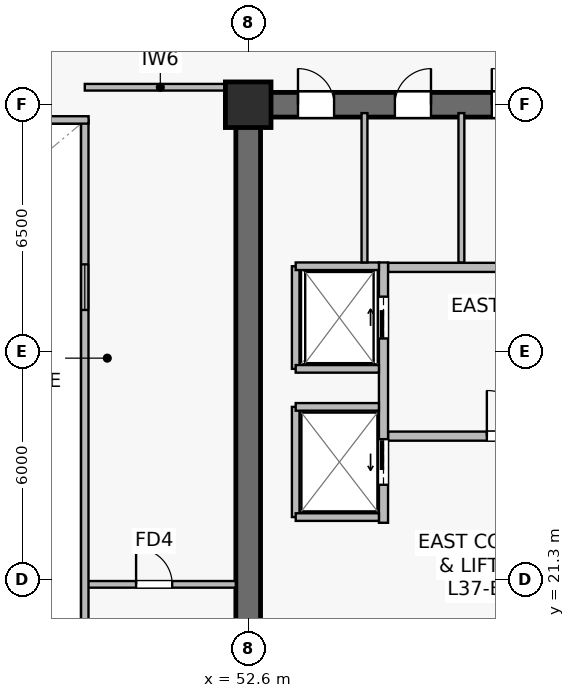
"""IFC4 building model, lengths in metres.
Left out: names, types, materials, properties, quantities, classifications, styles, units other than length and angle.
Written with IfcOpenShell. Run it as: python <this file> out.ifc"""

import sys

from ifc_helpers import new_model, si_unit, direction, frame, frame_2d, origin, origin_2d, place, context, subcontext, project, spatial, rectangle, extrude, source, transform, mapped, element, fill, save


model = new_model("IFC4")
c1 = context("Model", 3, precision=1e-05, world=origin(), true_north=direction((0.0, 1.0)))
c2 = subcontext(c1, "Body", "Model", "MODEL_VIEW")
j1 = project(units=[si_unit("LENGTHUNIT", "METRE"), si_unit("PLANEANGLEUNIT", "RADIAN")], contexts=[c1])
p1 = place(None, origin())
s1 = spatial("IfcSite", under=j1, at=p1, CompositionType="ELEMENT")
p2 = place(p1, origin())
s2 = spatial("IfcBuilding", under=s1, at=p2, CompositionType="ELEMENT")
p3 = place(p2, frame((0.0, 0.0, 154.3)))
s3 = spatial("IfcBuildingStorey", under=s2, at=p3, CompositionType="ELEMENT", Elevation=154.3)
p4 = place(p3, frame((52.275, 33.8, 0.0), z_axis=(0.0, 0.0, 1.0), x_axis=(1.0, 0.0, 0.0)))
e1 = element("IfcWall", 1, at=p4, inside=s3, PredefinedType="SHEAR", context=c2, shape_type="SweptSolid", body=[
    extrude(rectangle(XDim=15.45, YDim=0.65, at=frame_2d((7.725, 0.0))), origin(), (0.0, 0.0, 1.0), 3.79),
])
p5 = place(p4, frame((9.25, 0.0, 0.0)))
e2 = element("IfcOpeningElement", 2, at=p5, cuts=e1, PredefinedType="OPENING", context=c2, shape_type="SweptSolid", body=[
    extrude(rectangle(XDim=0.95, YDim=2.15, at=frame_2d((0.475, 1.075))), frame((0.0, 0.335, 0.0), z_axis=(0.0, -1.0, 0.0), x_axis=(1.0, 0.0, 0.0)), (0.0, 0.0, 1.0), 0.67),
])
p6 = place(p4, frame((6.735, 0.0, 0.0)))
e3 = element("IfcOpeningElement", 3, at=p6, cuts=e1, PredefinedType="OPENING", context=c2, shape_type="SweptSolid", body=[
    extrude(rectangle(XDim=0.95, YDim=2.15, at=frame_2d((0.475, 1.075))), frame((0.0, 0.335, 0.0), z_axis=(0.0, -1.0, 0.0), x_axis=(1.0, 0.0, 0.0)), (0.0, 0.0, 1.0), 0.67),
])
p7 = place(p4, frame((4.185, 0.0, 0.0)))
e4 = element("IfcOpeningElement", 4, at=p7, cuts=e1, PredefinedType="OPENING", context=c2, shape_type="SweptSolid", body=[
    extrude(rectangle(XDim=0.95, YDim=2.15, at=frame_2d((0.475, 1.075))), frame((0.0, 0.335, 0.0), z_axis=(0.0, -1.0, 0.0), x_axis=(1.0, 0.0, 0.0)), (0.0, 0.0, 1.0), 0.67),
])
p8 = place(p4, frame((1.635, 0.0, 0.0)))
e5 = element("IfcOpeningElement", 5, at=p8, cuts=e1, PredefinedType="OPENING", context=c2, shape_type="SweptSolid", body=[
    extrude(rectangle(XDim=0.95, YDim=2.15, at=frame_2d((0.475, 1.075))), frame((0.0, 0.335, 0.0), z_axis=(0.0, -1.0, 0.0), x_axis=(1.0, 0.0, 0.0)), (0.0, 0.0, 1.0), 0.67),
])
p9 = place(p3, frame((52.6, 15.125, 0.0), z_axis=(0.0, 0.0, 1.0), x_axis=(0.0, 1.0, 0.0)))
e6 = element("IfcWall", 6, at=p9, inside=s3, PredefinedType="SHEAR", context=c2, shape_type="SweptSolid", body=[
    extrude(rectangle(XDim=18.35, YDim=0.65, at=frame_2d((9.175, 0.0))), origin(), (0.0, 0.0, 1.0), 3.79),
])
p10 = place(p9, frame((3.425, 0.0, 0.0)))
e7 = element("IfcOpeningElement", 7, at=p10, cuts=e6, PredefinedType="OPENING", context=c2, shape_type="SweptSolid", body=[
    extrude(rectangle(XDim=1.42, YDim=2.2, at=frame_2d((0.71, 1.1))), frame((0.0, 0.335, 0.0), z_axis=(0.0, -1.0, 0.0), x_axis=(1.0, 0.0, 0.0)), (0.0, 0.0, 1.0), 0.67),
])
m1 = source(origin(), c2, "Body", "SweptSolid", [
    extrude(rectangle(XDim=1.2, YDim=1.2, at=origin_2d()), origin(), (0.0, 0.0, 1.0), 4.1),
])
p11 = place(p3, frame((52.6, 33.8, 0.0), z_axis=(0.0, 0.0, 1.0), x_axis=(1.0, 0.0, 0.0)))
e8 = element("IfcColumn", 8, at=p11, inside=s3, PredefinedType="COLUMN", context=c2, shape_type="MappedRepresentation", body=[
    mapped(m1, transform((0.0, 0.0, 0.0), scale=1.0)),
])
p12 = place(p3, frame((56.28, 25.08, 0.0), z_axis=(0.0, 0.0, 1.0), x_axis=(1.0, 0.0, 0.0)))
e9 = element("IfcWall", 9, at=p12, inside=s3, PredefinedType="SOLIDWALL", context=c2, shape_type="SweptSolid", body=[
    extrude(rectangle(XDim=6.92, YDim=0.24, at=frame_2d((3.46, 0.0))), origin(), (0.0, 0.0, 1.0), 3.187),
])
p13 = place(p12, frame((2.6, 0.0, 0.0)))
e10 = element("IfcOpeningElement", 10, at=p13, cuts=e9, PredefinedType="OPENING", context=c2, shape_type="SweptSolid", body=[
    extrude(rectangle(XDim=1.2, YDim=2.16, at=frame_2d((0.6, 1.08))), frame((0.0, 0.13, 0.0), z_axis=(0.0, -1.0, 0.0), x_axis=(1.0, 0.0, 0.0)), (0.0, 0.0, 1.0), 0.26),
])
p14 = place(p3, frame((56.28, 29.52, 0.0), z_axis=(0.0, 0.0, 1.0), x_axis=(1.0, 0.0, 0.0)))
e11 = element("IfcWall", 11, at=p14, inside=s3, PredefinedType="SOLIDWALL", context=c2, shape_type="SweptSolid", body=[
    extrude(rectangle(XDim=6.92, YDim=0.24, at=frame_2d((3.46, 0.0))), origin(), (0.0, 0.0, 1.0), 3.187),
])
p15 = place(p3, frame((56.16, 22.8, 0.0), z_axis=(0.0, 0.0, 1.0), x_axis=(0.0, 1.0, 0.0)))
e12 = element("IfcWall", 12, at=p15, inside=s3, PredefinedType="SOLIDWALL", context=c2, shape_type="SweptSolid", body=[
    extrude(rectangle(XDim=6.85, YDim=0.24, at=frame_2d((3.425, 0.0))), origin(), (0.0, 0.0, 1.0), 2.875),
])
p16 = place(p15, frame((4.85, 0.0, 0.0)))
e13 = element("IfcOpeningElement", 13, at=p16, cuts=e12, PredefinedType="OPENING", context=c2, shape_type="SweptSolid", body=[
    extrude(rectangle(XDim=1.1, YDim=2.22, at=frame_2d((0.55, 1.11))), frame((0.0, 0.13, 0.0), z_axis=(0.0, -1.0, 0.0), x_axis=(1.0, 0.0, 0.0)), (0.0, 0.0, 1.0), 0.26),
])
p17 = place(p15, frame((1.0, 0.0, 0.0)))
e14 = element("IfcOpeningElement", 14, at=p17, cuts=e12, PredefinedType="OPENING", context=c2, shape_type="SweptSolid", body=[
    extrude(rectangle(XDim=1.2, YDim=2.22, at=frame_2d((0.6, 1.11))), frame((0.0, 0.13, 0.0), z_axis=(0.0, -1.0, 0.0), x_axis=(1.0, 0.0, 0.0)), (0.0, 0.0, 1.0), 0.26),
])
p18 = place(p3, frame((53.85, 26.85, 0.0), z_axis=(0.0, 0.0, 1.0), x_axis=(0.0, 1.0, 0.0)))
e15 = element("IfcWall", 15, at=p18, inside=s3, PredefinedType="SOLIDWALL", context=c2, shape_type="SweptSolid", body=[
    extrude(rectangle(XDim=2.7, YDim=0.2, at=frame_2d((1.35, 0.0))), origin(), (0.0, 0.0, 1.0), 3.79),
])
p19 = place(p3, frame((53.85, 29.55, 0.0), z_axis=(0.0, 0.0, 1.0), x_axis=(1.0, 0.0, 0.0)))
e16 = element("IfcWall", 16, at=p19, inside=s3, PredefinedType="SOLIDWALL", context=c2, shape_type="SweptSolid", body=[
    extrude(rectangle(XDim=2.19, YDim=0.2, at=frame_2d((1.095, 0.0))), origin(), (0.0, 0.0, 1.0), 3.79),
])
p20 = place(p3, frame((53.85, 26.85, 0.0), z_axis=(0.0, 0.0, 1.0), x_axis=(1.0, 0.0, 0.0)))
e17 = element("IfcWall", 17, at=p20, inside=s3, PredefinedType="SOLIDWALL", context=c2, shape_type="SweptSolid", body=[
    extrude(rectangle(XDim=2.19, YDim=0.2, at=frame_2d((1.095, 0.0))), origin(), (0.0, 0.0, 1.0), 3.187),
])
p21 = place(p3, frame((53.85, 22.95, 0.0), z_axis=(0.0, 0.0, 1.0), x_axis=(0.0, 1.0, 0.0)))
e18 = element("IfcWall", 18, at=p21, inside=s3, PredefinedType="SOLIDWALL", context=c2, shape_type="SweptSolid", body=[
    extrude(rectangle(XDim=2.9, YDim=0.2, at=frame_2d((1.45, 0.0))), origin(), (0.0, 0.0, 1.0), 2.875),
])
for number, where, z_axis, x_axis in (
    (19, (53.85, 25.85, 0.0), (0.0, 0.0, 1.0), (1.0, 0.0, 0.0)),
    (20, (53.85, 22.95, 0.0), (0.0, 0.0, 1.0), (1.0, 0.0, 0.0)),
):
    element("IfcWall", number, at=place(p3, frame(where, z_axis=z_axis, x_axis=x_axis)), inside=s3, PredefinedType="SOLIDWALL", context=c2, shape_type="SweptSolid", body=[
        extrude(rectangle(XDim=2.19, YDim=0.2, at=frame_2d((1.095, 0.0))), origin(), (0.0, 0.0, 1.0), 3.79),
    ])
for number, where, z_axis, x_axis in (
    (21, (58.21, 29.65, 0.0), (0.0, 0.0, 1.0), (0.0, 1.0, 0.0)),
    (22, (55.66, 29.65, 0.0), (0.0, 0.0, 1.0), (0.0, 1.0, 0.0)),
):
    element("IfcWall", number, at=place(p3, frame(where, z_axis=z_axis, x_axis=x_axis)), inside=s3, PredefinedType="PLUMBINGWALL", context=c2, shape_type="SweptSolid", body=[
        extrude(rectangle(XDim=3.93, YDim=0.155, at=frame_2d((1.965, 0.0))), origin(), (0.0, 0.0, 1.0), 3.79),
    ])
p22 = place(p3, frame((48.3, 34.26, 0.0), z_axis=(0.0, 0.0, 1.0), x_axis=(1.0, 0.0, 0.0)))
e23 = element("IfcWall", 23, at=p22, inside=s3, PredefinedType="PARTITIONING", context=c2, shape_type="SweptSolid", body=[
    extrude(rectangle(XDim=3.975, YDim=0.175, at=frame_2d((1.987, 0.0))), origin(), (0.0, 0.0, 1.0), 3.475),
])
p23 = place(p3, frame((48.3, 21.18, 0.0), z_axis=(0.0, 0.0, 1.0), x_axis=(1.0, 0.0, 0.0)))
e24 = element("IfcWall", 24, at=p23, inside=s3, PredefinedType="PARTITIONING", context=c2, shape_type="SweptSolid", body=[
    extrude(rectangle(XDim=3.975, YDim=0.175, at=frame_2d((1.987, 0.0))), origin(), (0.0, 0.0, 1.0), 3.79),
])
p24 = place(p23, frame((1.35, 0.0, 0.0)))
e25 = element("IfcOpeningElement", 25, at=p24, cuts=e24, PredefinedType="OPENING", context=c2, shape_type="SweptSolid", body=[
    extrude(rectangle(XDim=0.95, YDim=2.15, at=frame_2d((0.475, 1.075))), frame((0.0, 0.098, 0.0), z_axis=(0.0, -1.0, 0.0), x_axis=(1.0, 0.0, 0.0)), (0.0, 0.0, 1.0), 0.195),
])
p25 = place(p3, frame((48.3, 15.2, 0.0), z_axis=(0.0, 0.0, 1.0), x_axis=(0.0, 1.0, 0.0)))
e26 = element("IfcWall", 26, at=p25, inside=s3, PredefinedType="SOLIDWALL", context=c2, shape_type="SweptSolid", body=[
    extrude(rectangle(XDim=18.2, YDim=0.195, at=frame_2d((9.1, 0.0))), origin(), (0.0, 0.0, 1.0), 3.79),
])
p26 = place(p25, frame((1.8, 0.0, 0.9)))
e27 = element("IfcOpeningElement", 27, at=p26, cuts=e26, PredefinedType="OPENING", context=c2, shape_type="SweptSolid", body=[
    extrude(rectangle(XDim=1.2, YDim=1.35, at=frame_2d((0.6, 0.675))), frame((0.0, 0.107, 0.0), z_axis=(0.0, -1.0, 0.0), x_axis=(1.0, 0.0, 0.0)), (0.0, 0.0, 1.0), 0.215),
])
p27 = place(p25, frame((13.2, 0.0, 0.9)))
e28 = element("IfcOpeningElement", 28, at=p27, cuts=e26, PredefinedType="OPENING", context=c2, shape_type="SweptSolid", body=[
    extrude(rectangle(XDim=1.2, YDim=1.35, at=frame_2d((0.6, 0.675))), frame((0.0, 0.107, 0.0), z_axis=(0.0, -1.0, 0.0), x_axis=(1.0, 0.0, 0.0)), (0.0, 0.0, 1.0), 0.215),
])
p28 = place(p3, frame((26.4, 33.4, 0.0), z_axis=(0.0, 0.0, 1.0), x_axis=(1.0, 0.0, 0.0)))
e29 = element("IfcWall", 29, at=p28, inside=s3, PredefinedType="SOLIDWALL", context=c2, shape_type="SweptSolid", body=[
    extrude(rectangle(XDim=22.0, YDim=0.195, at=frame_2d((11.0, 0.0))), origin(), (0.0, 0.0, 1.0), 3.79),
])
m2 = source(origin(), c2, "Body", "SweptSolid", [
    extrude(rectangle(XDim=1.2, YDim=1.35, at=frame_2d((0.6, 0.675))), frame((0.0, 0.03, 0.0), z_axis=(0.0, -1.0, 0.0), x_axis=(1.0, 0.0, 0.0)), (0.0, 0.0, 1.0), 0.06),
])
p29 = place(p27, origin())
e30 = element("IfcWindow", 30, at=p29, inside=s3, PartitioningType="SINGLE_PANEL", PredefinedType="WINDOW", context=c2, shape_type="MappedRepresentation", body=[
    mapped(m2, transform((0.0, 0.0, 0.0), scale=1.0)),
])
fill(e28, e30)
m3 = source(origin(), c2, "Body", "SweptSolid", [
    extrude(rectangle(XDim=1.2, YDim=2.16, at=frame_2d((0.6, 1.08))), frame((0.0, 0.025, 0.0), z_axis=(0.0, -1.0, 0.0), x_axis=(1.0, 0.0, 0.0)), (0.0, 0.0, 1.0), 0.05),
])
p30 = place(p13, origin())
e31 = element("IfcDoor", 31, at=p30, inside=s3, OperationType="SINGLE_SWING_LEFT", PredefinedType="DOOR", context=c2, shape_type="MappedRepresentation", body=[
    mapped(m3, transform((0.0, 0.0, 0.0), scale=1.0)),
])
fill(e10, e31)
m4 = source(origin(), c2, "Body", "SweptSolid", [
    extrude(rectangle(XDim=1.1, YDim=2.22, at=frame_2d((0.55, 1.11))), frame((0.0, 0.025, 0.0), z_axis=(0.0, -1.0, 0.0), x_axis=(1.0, 0.0, 0.0)), (0.0, 0.0, 1.0), 0.05),
])
p31 = place(p16, origin())
e32 = element("IfcDoor", 32, at=p31, inside=s3, OperationType="SLIDING_TO_RIGHT", PredefinedType="USERDEFINED", context=c2, shape_type="MappedRepresentation", body=[
    mapped(m4, transform((0.0, 0.0, 0.0), scale=1.0)),
])
fill(e13, e32)
m5 = source(origin(), c2, "Body", "SweptSolid", [
    extrude(rectangle(XDim=1.2, YDim=2.22, at=frame_2d((0.6, 1.11))), frame((0.0, 0.025, 0.0), z_axis=(0.0, -1.0, 0.0), x_axis=(1.0, 0.0, 0.0)), (0.0, 0.0, 1.0), 0.05),
])
p32 = place(p17, origin())
e33 = element("IfcDoor", 33, at=p32, inside=s3, OperationType="SLIDING_TO_LEFT", PredefinedType="USERDEFINED", context=c2, shape_type="MappedRepresentation", body=[
    mapped(m5, transform((0.0, 0.0, 0.0), scale=1.0)),
])
fill(e14, e33)
m6 = source(origin(), c2, "Body", "SweptSolid", [
    extrude(rectangle(XDim=0.95, YDim=2.15, at=frame_2d((0.475, 1.075))), frame((0.0, 0.025, 0.0), z_axis=(0.0, -1.0, 0.0), x_axis=(1.0, 0.0, 0.0)), (0.0, 0.0, 1.0), 0.05),
])
p33 = place(p6, origin())
e34 = element("IfcDoor", 34, at=p33, inside=s3, OperationType="SINGLE_SWING_LEFT", PredefinedType="DOOR", context=c2, shape_type="MappedRepresentation", body=[
    mapped(m6, transform((0.0, 0.0, 0.0), scale=1.0)),
])
fill(e3, e34)
p34 = place(p7, origin())
e35 = element("IfcDoor", 35, at=p34, inside=s3, OperationType="SINGLE_SWING_RIGHT", PredefinedType="DOOR", context=c2, shape_type="MappedRepresentation", body=[
    mapped(m6, transform((0.0, 0.0, 0.0), scale=1.0)),
])
fill(e4, e35)
p35 = place(p8, origin())
e36 = element("IfcDoor", 36, at=p35, inside=s3, OperationType="SINGLE_SWING_LEFT", PredefinedType="DOOR", context=c2, shape_type="MappedRepresentation", body=[
    mapped(m6, transform((0.0, 0.0, 0.0), scale=1.0)),
])
fill(e5, e36)
p36 = place(p24, origin())
e37 = element("IfcDoor", 37, at=p36, inside=s3, OperationType="SINGLE_SWING_LEFT", PredefinedType="DOOR", context=c2, shape_type="MappedRepresentation", body=[
    mapped(m6, transform((0.0, 0.0, 0.0), scale=1.0)),
])
fill(e25, e37)
save(model, sys.argv[1])
